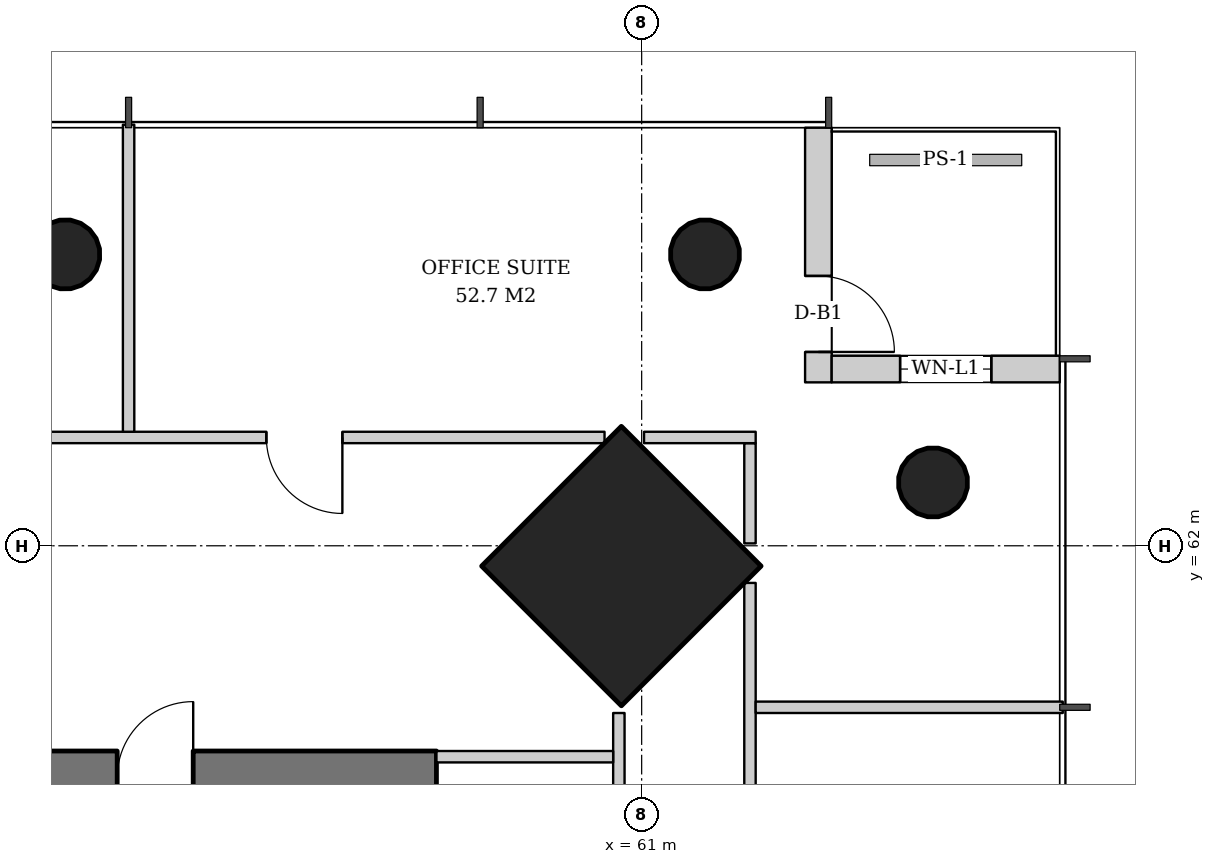
"""IFC4 building model, lengths in metres.
Left out: names, types, materials, properties, quantities, classifications, styles, units other than length and angle.
Written with IfcOpenShell. Run it as: python <this file> out.ifc"""

import sys

from ifc_helpers import new_model, si_unit, direction, frame, frame_2d, origin, origin_2d, place, context, subcontext, project, spatial, rectangle, hollow_circle, extrude, element, fill, save


model = new_model("IFC4")
c1 = context("Model", 3, precision=1e-05, world=origin(), true_north=direction((0.0, 1.0)))
c2 = subcontext(c1, "Body", "Model", "MODEL_VIEW")
j1 = project(units=[si_unit("LENGTHUNIT", "METRE"), si_unit("PLANEANGLEUNIT", "RADIAN")], contexts=[c1])
p1 = place(None, origin())
s1 = spatial("IfcSite", under=j1, at=p1, CompositionType="ELEMENT")
p2 = place(p1, origin())
s2 = spatial("IfcBuilding", under=s1, at=p2, CompositionType="ELEMENT")
p3 = place(p2, frame((0.0, 0.0, 150.2)))
s3 = spatial("IfcBuildingStorey", under=s2, at=p3, CompositionType="ELEMENT", Elevation=150.2)
p4 = place(p3, frame((60.771, 61.771, 0.0), z_axis=(-0.031962158256, -0.031962158256, 0.998977898093), x_axis=(0.707106781187, -0.707106781187, 0.0)))
e1 = element("IfcColumn", 1, at=p4, inside=s3, PredefinedType="COLUMN", context=c2, shape_type="SweptSolid", body=[
    extrude(rectangle(XDim=2.6, YDim=2.6, at=origin_2d()), origin(), (0.0, 0.0, 1.0), 3.804),
])
for number, where, z_axis, x_axis in (
    (2, (64.871, 62.871, 0.0), (-0.032, -0.032, 0.999), (0.707, -0.707, 0.0)),
    (3, (61.871, 65.871, 0.0), (-0.032, -0.032, 0.999), (0.707, -0.707, 0.0)),
):
    element("IfcColumn", number, at=place(p3, frame(where, z_axis=z_axis, x_axis=x_axis)), inside=s3, PredefinedType="COLUMN", context=c2, shape_type="SweptSolid", body=[
        extrude(hollow_circle(Radius=0.457, WallThickness=0.03, at=origin_2d()), origin(), (0.0, 0.0, 1.0), 3.804),
    ])
p5 = place(p3, frame((53.436, 65.871, 0.0), z_axis=(-0.015987237665, -0.031910269556, 0.999362868496), x_axis=(0.894067115991, -0.447933021895, 0.0)))
e4 = element("IfcColumn", 4, at=p5, inside=s3, PredefinedType="COLUMN", context=c2, shape_type="SweptSolid", body=[
    extrude(hollow_circle(Radius=0.457, WallThickness=0.03, at=origin_2d()), origin(), (0.0, 0.0, 1.0), 3.802),
])
p6 = place(p3, frame((31.7, 58.95, 0.0), z_axis=(0.0, 0.0, 1.0), x_axis=(1.0, 0.0, 0.0)))
e5 = element("IfcWall", 5, at=p6, inside=s3, PredefinedType="SHEAR", context=c2, shape_type="SweptSolid", body=[
    extrude(rectangle(XDim=26.6, YDim=0.7, at=frame_2d((13.3, 0.0))), origin(), (0.0, 0.0, 1.0), 3.8),
])
p7 = place(p6, frame((17.94, 0.0, 0.0)))
e6 = element("IfcOpeningElement", 6, at=p7, cuts=e5, PredefinedType="OPENING", context=c2, shape_type="SweptSolid", body=[
    extrude(rectangle(XDim=1.0, YDim=2.1, at=frame_2d((0.5, 1.05))), frame((0.0, 0.36, 0.0), z_axis=(0.0, -1.0, 0.0), x_axis=(1.0, 0.0, 0.0)), (0.0, 0.0, 1.0), 0.72),
])
p8 = place(p6, frame((5.825, 0.0, 0.0)))
e7 = element("IfcOpeningElement", 7, at=p8, cuts=e5, PredefinedType="OPENING", context=c2, shape_type="SweptSolid", body=[
    extrude(rectangle(XDim=1.0, YDim=2.1, at=frame_2d((0.5, 1.05))), frame((0.0, 0.36, 0.0), z_axis=(0.0, -1.0, 0.0), x_axis=(1.0, 0.0, 0.0)), (0.0, 0.0, 1.0), 0.72),
])
p9 = place(p6, frame((1.169, 0.0, 0.0)))
e8 = element("IfcOpeningElement", 8, at=p9, cuts=e5, PredefinedType="OPENING", context=c2, shape_type="SweptSolid", body=[
    extrude(rectangle(XDim=1.0, YDim=2.1, at=frame_2d((0.5, 1.05))), frame((0.0, 0.36, 0.0), z_axis=(0.0, -1.0, 0.0), x_axis=(1.0, 0.0, 0.0)), (0.0, 0.0, 1.0), 0.72),
])
p10 = place(p6, frame((2.683, 0.0, 0.0)))
e9 = element("IfcOpeningElement", 9, at=p10, cuts=e5, PredefinedType="OPENING", context=c2, shape_type="SweptSolid", body=[
    extrude(rectangle(XDim=1.0, YDim=2.1, at=frame_2d((0.5, 1.05))), frame((0.0, 0.36, 0.0), z_axis=(0.0, -1.0, 0.0), x_axis=(1.0, 0.0, 0.0)), (0.0, 0.0, 1.0), 0.72),
])
p11 = place(p6, frame((4.211, 0.0, 0.0)))
e10 = element("IfcOpeningElement", 10, at=p11, cuts=e5, PredefinedType="OPENING", context=c2, shape_type="SweptSolid", body=[
    extrude(rectangle(XDim=1.0, YDim=2.1, at=frame_2d((0.5, 1.05))), frame((0.0, 0.36, 0.0), z_axis=(0.0, -1.0, 0.0), x_axis=(1.0, 0.0, 0.0)), (0.0, 0.0, 1.0), 0.72),
])
p12 = place(p6, frame((8.44, 0.0, 0.0)))
e11 = element("IfcOpeningElement", 11, at=p12, cuts=e5, PredefinedType="OPENING", context=c2, shape_type="SweptSolid", body=[
    extrude(rectangle(XDim=1.0, YDim=2.1, at=frame_2d((0.5, 1.05))), frame((0.0, 0.36, 0.0), z_axis=(0.0, -1.0, 0.0), x_axis=(1.0, 0.0, 0.0)), (0.0, 0.0, 1.0), 0.72),
])
p13 = place(p6, frame((13.342, 0.0, 0.0)))
e12 = element("IfcOpeningElement", 12, at=p13, cuts=e5, PredefinedType="OPENING", context=c2, shape_type="SweptSolid", body=[
    extrude(rectangle(XDim=1.0, YDim=2.1, at=frame_2d((0.5, 1.05))), frame((0.0, 0.36, 0.0), z_axis=(0.0, -1.0, 0.0), x_axis=(1.0, 0.0, 0.0)), (0.0, 0.0, 1.0), 0.72),
])
p14 = place(p6, frame((22.4, 0.0, 0.0)))
e13 = element("IfcOpeningElement", 13, at=p14, cuts=e5, PredefinedType="OPENING", context=c2, shape_type="SweptSolid", body=[
    extrude(rectangle(XDim=1.0, YDim=2.1, at=frame_2d((0.5, 1.05))), frame((0.0, 0.36, 0.0), z_axis=(0.0, -1.0, 0.0), x_axis=(1.0, 0.0, 0.0)), (0.0, 0.0, 1.0), 0.72),
])
p15 = place(p3, frame((63.325, 67.5, 0.0), z_axis=(0.0, 0.0, 1.0), x_axis=(0.0, -1.0, 0.0)))
e14 = element("IfcWall", 14, at=p15, inside=s3, PredefinedType="SOLIDWALL", context=c2, shape_type="SweptSolid", body=[
    extrude(rectangle(XDim=3.35, YDim=0.35, at=frame_2d((1.675, 0.0))), origin(), (0.0, 0.0, 1.0), 3.62),
])
p16 = place(p15, frame((1.95, 0.0, 0.0)))
e15 = element("IfcOpeningElement", 15, at=p16, cuts=e14, PredefinedType="OPENING", context=c2, shape_type="SweptSolid", body=[
    extrude(rectangle(XDim=1.0, YDim=2.4, at=frame_2d((0.5, 1.2))), frame((0.0, 0.185, 0.0), z_axis=(0.0, -1.0, 0.0), x_axis=(1.0, 0.0, 0.0)), (0.0, 0.0, 1.0), 0.37),
])
p17 = place(p3, frame((63.5, 64.325, 0.0), z_axis=(0.0, 0.0, 1.0), x_axis=(1.0, 0.0, 0.0)))
e16 = element("IfcWall", 16, at=p17, inside=s3, PredefinedType="SOLIDWALL", context=c2, shape_type="SweptSolid", body=[
    extrude(rectangle(XDim=3.0, YDim=0.35, at=frame_2d((1.5, 0.0))), origin(), (0.0, 0.0, 1.0), 3.62),
])
p18 = place(p17, frame((0.9, 0.0, 0.6)))
e17 = element("IfcOpeningElement", 17, at=p18, cuts=e16, PredefinedType="OPENING", context=c2, shape_type="SweptSolid", body=[
    extrude(rectangle(XDim=1.2, YDim=2.55, at=frame_2d((0.6, 1.275))), frame((0.0, 0.185, 0.0), z_axis=(0.0, -1.0, 0.0), x_axis=(1.0, 0.0, 0.0)), (0.0, 0.0, 1.0), 0.37),
])
p19 = place(p3, frame((60.7, 48.025, 0.0), z_axis=(0.0, 0.0, 1.0), x_axis=(0.0, 1.0, 0.0)))
e18 = element("IfcWall", 18, at=p19, inside=s3, PredefinedType="PARTITIONING", context=c2, shape_type="SweptSolid", body=[
    extrude(rectangle(XDim=11.775, YDim=0.15, at=frame_2d((5.888, 0.0))), origin(), (0.0, 0.0, 1.0), 2.806),
])
p20 = place(p19, frame((5.137, 0.0, 0.0)))
e19 = element("IfcOpeningElement", 19, at=p20, cuts=e18, PredefinedType="OPENING", context=c2, shape_type="SweptSolid", body=[
    extrude(rectangle(XDim=1.0, YDim=2.1, at=frame_2d((0.5, 1.05))), frame((0.0, 0.085, 0.0), z_axis=(0.0, -1.0, 0.0), x_axis=(1.0, 0.0, 0.0)), (0.0, 0.0, 1.0), 0.17),
])
p21 = place(p3, frame((58.3, 59.225, 0.0), z_axis=(0.0, 0.0, 1.0), x_axis=(1.0, 0.0, 0.0)))
e20 = element("IfcWall", 20, at=p21, inside=s3, PredefinedType="PARTITIONING", context=c2, shape_type="SweptSolid", body=[
    extrude(rectangle(XDim=2.325, YDim=0.15, at=frame_2d((1.163, 0.0))), origin(), (0.0, 0.0, 1.0), 3.62),
])
p22 = place(p3, frame((62.425, 30.489, 0.0), z_axis=(0.0, 0.0, 1.0), x_axis=(0.0, 1.0, 0.0)))
e21 = element("IfcWall", 21, at=p22, inside=s3, PredefinedType="PARTITIONING", context=c2, shape_type="SweptSolid", body=[
    extrude(rectangle(XDim=31.023, YDim=0.15, at=frame_2d((15.511, 0.0))), origin(), (0.0, 0.0, 1.0), 2.72),
])
p23 = place(p22, frame((3.449, 0.0, 0.0)))
e22 = element("IfcOpeningElement", 22, at=p23, cuts=e21, PredefinedType="OPENING", context=c2, shape_type="SweptSolid", body=[
    extrude(rectangle(XDim=1.0, YDim=2.1, at=frame_2d((0.5, 1.05))), frame((0.0, 0.085, 0.0), z_axis=(0.0, -1.0, 0.0), x_axis=(1.0, 0.0, 0.0)), (0.0, 0.0, 1.0), 0.17),
])
p24 = place(p22, frame((8.074, 0.0, 0.0)))
e23 = element("IfcOpeningElement", 23, at=p24, cuts=e21, PredefinedType="OPENING", context=c2, shape_type="SweptSolid", body=[
    extrude(rectangle(XDim=1.0, YDim=2.1, at=frame_2d((0.5, 1.05))), frame((0.0, 0.085, 0.0), z_axis=(0.0, -1.0, 0.0), x_axis=(1.0, 0.0, 0.0)), (0.0, 0.0, 1.0), 0.17),
])
p25 = place(p22, frame((12.699, 0.0, 0.0)))
e24 = element("IfcOpeningElement", 24, at=p25, cuts=e21, PredefinedType="OPENING", context=c2, shape_type="SweptSolid", body=[
    extrude(rectangle(XDim=1.0, YDim=2.1, at=frame_2d((0.5, 1.05))), frame((0.0, 0.085, 0.0), z_axis=(0.0, -1.0, 0.0), x_axis=(1.0, 0.0, 0.0)), (0.0, 0.0, 1.0), 0.17),
])
p26 = place(p22, frame((17.324, 0.0, 0.0)))
e25 = element("IfcOpeningElement", 25, at=p26, cuts=e21, PredefinedType="OPENING", context=c2, shape_type="SweptSolid", body=[
    extrude(rectangle(XDim=1.0, YDim=2.1, at=frame_2d((0.5, 1.05))), frame((0.0, 0.085, 0.0), z_axis=(0.0, -1.0, 0.0), x_axis=(1.0, 0.0, 0.0)), (0.0, 0.0, 1.0), 0.17),
])
p27 = place(p22, frame((21.949, 0.0, 0.0)))
e26 = element("IfcOpeningElement", 26, at=p27, cuts=e21, PredefinedType="OPENING", context=c2, shape_type="SweptSolid", body=[
    extrude(rectangle(XDim=1.0, YDim=2.1, at=frame_2d((0.5, 1.05))), frame((0.0, 0.085, 0.0), z_axis=(0.0, -1.0, 0.0), x_axis=(1.0, 0.0, 0.0)), (0.0, 0.0, 1.0), 0.17),
])
p28 = place(p22, frame((26.574, 0.0, 0.0)))
e27 = element("IfcOpeningElement", 27, at=p28, cuts=e21, PredefinedType="OPENING", context=c2, shape_type="SweptSolid", body=[
    extrude(rectangle(XDim=1.0, YDim=2.1, at=frame_2d((0.5, 1.05))), frame((0.0, 0.085, 0.0), z_axis=(0.0, -1.0, 0.0), x_axis=(1.0, 0.0, 0.0)), (0.0, 0.0, 1.0), 0.17),
])
p29 = place(p3, frame((62.425, 62.031, 0.0), z_axis=(0.0, 0.0, 1.0), x_axis=(0.0, 1.0, 0.0)))
e28 = element("IfcWall", 28, at=p29, inside=s3, PredefinedType="PARTITIONING", context=c2, shape_type="SweptSolid", body=[
    extrude(rectangle(XDim=1.319, YDim=0.15, at=frame_2d((0.659, 0.0))), origin(), (0.0, 0.0, 1.0), 3.07),
])
p30 = place(p3, frame((62.5, 59.875, 0.0), z_axis=(0.0, 0.0, 1.0), x_axis=(1.0, 0.0, 0.0)))
e29 = element("IfcWall", 29, at=p30, inside=s3, PredefinedType="PARTITIONING", context=c2, shape_type="SweptSolid", body=[
    extrude(rectangle(XDim=4.04, YDim=0.15, at=frame_2d((2.02, 0.0))), origin(), (0.0, 0.0, 1.0), 2.82),
])
p31 = place(p3, frame((62.5, 63.425, 0.0), z_axis=(0.0, 0.0, 1.0), x_axis=(-1.0, 0.0, 0.0)))
e30 = element("IfcWall", 30, at=p31, inside=s3, PredefinedType="PARTITIONING", context=c2, shape_type="SweptSolid", body=[
    extrude(rectangle(XDim=1.469, YDim=0.15, at=frame_2d((0.734, 0.0))), origin(), (0.0, 0.0, 1.0), 3.07),
])
p32 = place(p3, frame((60.511, 63.425, 0.0), z_axis=(0.0, 0.0, 1.0), x_axis=(-1.0, 0.0, 0.0)))
e31 = element("IfcWall", 31, at=p32, inside=s3, PredefinedType="PARTITIONING", context=c2, shape_type="SweptSolid", body=[
    extrude(rectangle(XDim=31.023, YDim=0.15, at=frame_2d((15.511, 0.0))), origin(), (0.0, 0.0, 1.0), 2.72),
])
p33 = place(p32, frame((3.449, 0.0, 0.0)))
e32 = element("IfcOpeningElement", 32, at=p33, cuts=e31, PredefinedType="OPENING", context=c2, shape_type="SweptSolid", body=[
    extrude(rectangle(XDim=1.0, YDim=2.1, at=frame_2d((0.5, 1.05))), frame((0.0, 0.085, 0.0), z_axis=(0.0, -1.0, 0.0), x_axis=(1.0, 0.0, 0.0)), (0.0, 0.0, 1.0), 0.17),
])
p34 = place(p32, frame((8.074, 0.0, 0.0)))
e33 = element("IfcOpeningElement", 33, at=p34, cuts=e31, PredefinedType="OPENING", context=c2, shape_type="SweptSolid", body=[
    extrude(rectangle(XDim=1.0, YDim=2.1, at=frame_2d((0.5, 1.05))), frame((0.0, 0.085, 0.0), z_axis=(0.0, -1.0, 0.0), x_axis=(1.0, 0.0, 0.0)), (0.0, 0.0, 1.0), 0.17),
])
p35 = place(p32, frame((12.699, 0.0, 0.0)))
e34 = element("IfcOpeningElement", 34, at=p35, cuts=e31, PredefinedType="OPENING", context=c2, shape_type="SweptSolid", body=[
    extrude(rectangle(XDim=1.0, YDim=2.1, at=frame_2d((0.5, 1.05))), frame((0.0, 0.085, 0.0), z_axis=(0.0, -1.0, 0.0), x_axis=(1.0, 0.0, 0.0)), (0.0, 0.0, 1.0), 0.17),
])
p36 = place(p32, frame((21.949, 0.0, 0.0)))
e35 = element("IfcOpeningElement", 35, at=p36, cuts=e31, PredefinedType="OPENING", context=c2, shape_type="SweptSolid", body=[
    extrude(rectangle(XDim=1.0, YDim=2.1, at=frame_2d((0.5, 1.05))), frame((0.0, 0.085, 0.0), z_axis=(0.0, -1.0, 0.0), x_axis=(1.0, 0.0, 0.0)), (0.0, 0.0, 1.0), 0.17),
])
p37 = place(p3, frame((54.25, 63.5, 0.0), z_axis=(0.0, 0.0, 1.0), x_axis=(0.0, 1.0, 0.0)))
e36 = element("IfcWall", 36, at=p37, inside=s3, PredefinedType="PARTITIONING", context=c2, shape_type="SweptSolid", body=[
    extrude(rectangle(XDim=4.04, YDim=0.15, at=frame_2d((2.02, 0.0))), origin(), (0.0, 0.0, 1.0), 2.82),
])
p38 = place(p16, origin())
e37 = element("IfcDoor", 37, at=p38, inside=s3, OperationType="SINGLE_SWING_RIGHT", PredefinedType="DOOR", context=c2, shape_type="SweptSolid", body=[
    extrude(rectangle(XDim=1.0, YDim=2.4, at=frame_2d((0.5, 1.2))), frame((0.0, 0.025, 0.0), z_axis=(0.0, -1.0, 0.0), x_axis=(1.0, 0.0, 0.0)), (0.0, 0.0, 1.0), 0.05),
])
fill(e15, e37)
p39 = place(p18, origin())
e38 = element("IfcWindow", 38, at=p39, inside=s3, PartitioningType="SINGLE_PANEL", PredefinedType="WINDOW", context=c2, shape_type="SweptSolid", body=[
    extrude(rectangle(XDim=1.2, YDim=2.55, at=frame_2d((0.6, 1.275))), frame((0.0, 0.03, 0.0), z_axis=(0.0, -1.0, 0.0), x_axis=(1.0, 0.0, 0.0)), (0.0, 0.0, 1.0), 0.06),
])
fill(e17, e38)
p40 = place(p33, origin())
e39 = element("IfcDoor", 39, at=p40, inside=s3, OperationType="SINGLE_SWING_LEFT", PredefinedType="DOOR", context=c2, shape_type="SweptSolid", body=[
    extrude(rectangle(XDim=1.0, YDim=2.1, at=frame_2d((0.5, 1.05))), frame((0.0, 0.025, 0.0), z_axis=(0.0, -1.0, 0.0), x_axis=(1.0, 0.0, 0.0)), (0.0, 0.0, 1.0), 0.05),
])
fill(e32, e39)
save(model, sys.argv[1])
